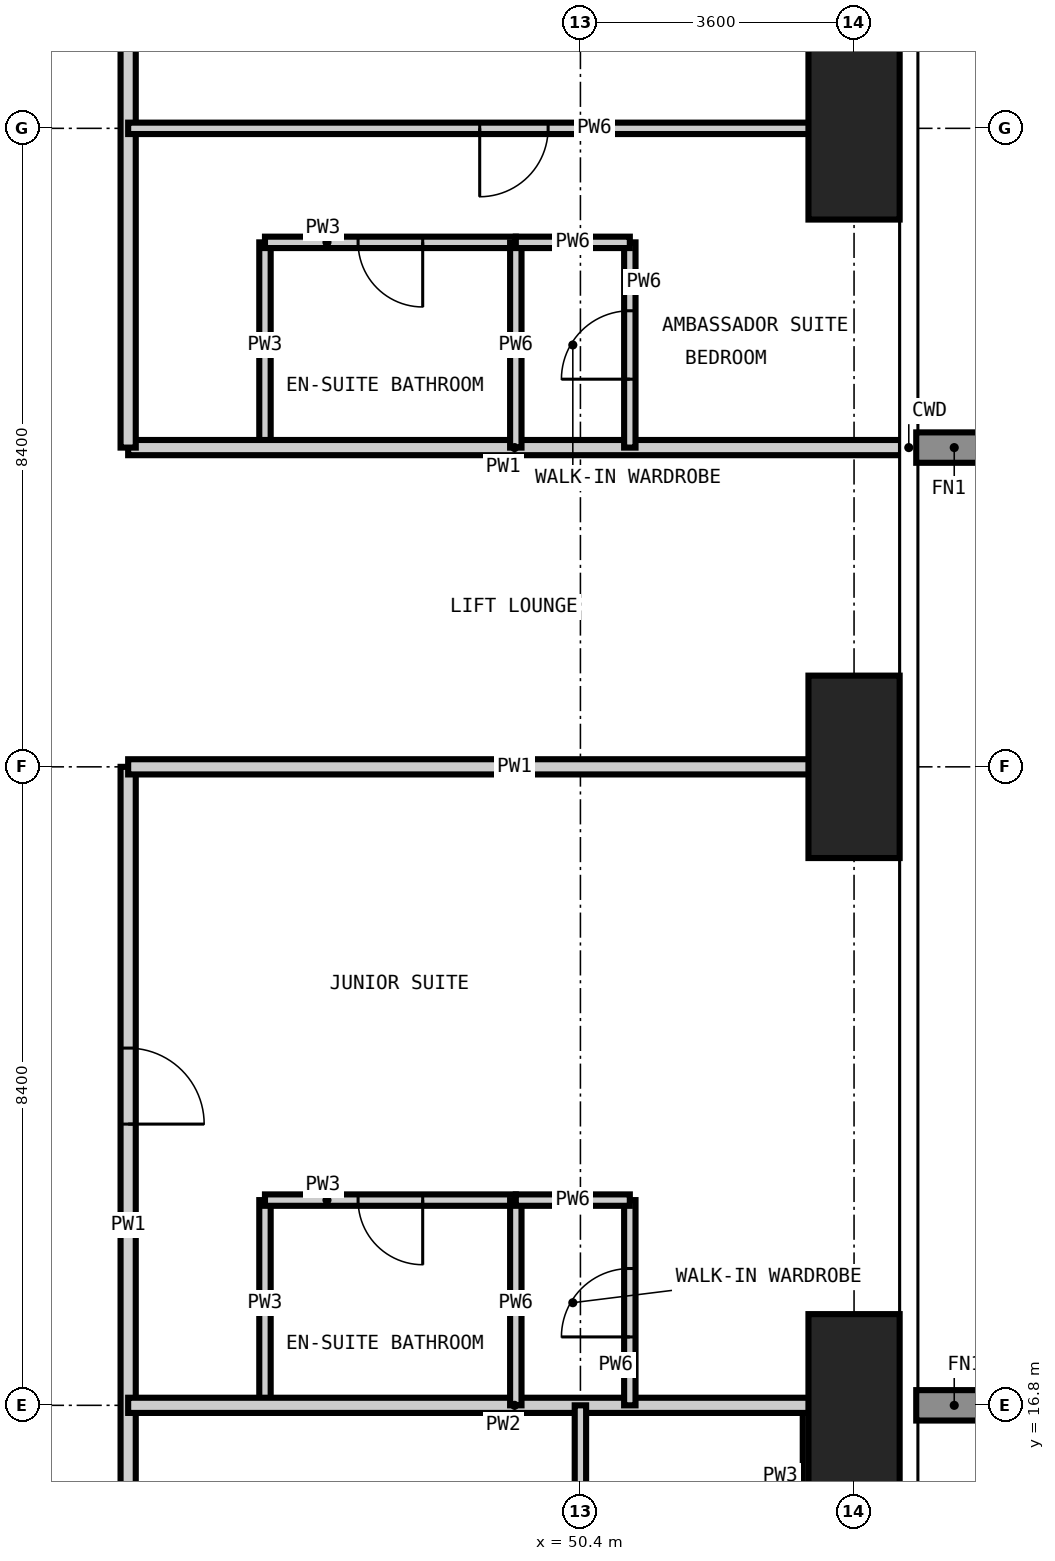
"""IFC4 building model, lengths in metres.
Left out: names, types, materials, properties, quantities, classifications, styles, units other than length and angle.
Written with IfcOpenShell. Run it as: python <this file> out.ifc"""

import sys

from ifc_helpers import new_model, si_unit, direction, frame, frame_2d, origin, origin_2d, place, context, subcontext, project, spatial, rectangle, extrude, element, fill, save


model = new_model("IFC4")
c1 = context("Model", 3, precision=1e-05, world=origin(), true_north=direction((0.0, 1.0)))
c2 = subcontext(c1, "Body", "Model", "MODEL_VIEW")
j1 = project(units=[si_unit("LENGTHUNIT", "METRE"), si_unit("PLANEANGLEUNIT", "RADIAN")], contexts=[c1])
p1 = place(None, origin())
s1 = spatial("IfcSite", under=j1, at=p1, CompositionType="ELEMENT")
p2 = place(p1, origin())
s2 = spatial("IfcBuilding", under=s1, at=p2, CompositionType="ELEMENT")
p3 = place(p2, frame((0.0, 0.0, 229.5)))
s3 = spatial("IfcBuildingStorey", under=s2, at=p3, CompositionType="ELEMENT", Elevation=229.5)
for number, where, z_axis, x_axis in (
    (1, (54.0, 16.8, -0.35), (0.0, 0.0, 1.0), (1.0, 0.0, 0.0)),
    (2, (54.0, 25.2, -0.35), (0.0, 0.0, 1.0), (1.0, 0.0, 0.0)),
    (3, (54.0, 33.6, -0.35), (0.0, 0.0, 1.0), (1.0, 0.0, 0.0)),
):
    element("IfcColumn", number, at=place(p3, frame(where, z_axis=z_axis, x_axis=x_axis)), inside=s3, PredefinedType="COLUMN", context=c2, shape_type="SweptSolid", body=[
        extrude(rectangle(XDim=1.2, YDim=2.4, at=origin_2d()), origin(), (0.0, 0.0, 1.0), 3.9),
    ])
p4 = place(p3, frame((46.25, 16.8, 0.0), z_axis=(0.0, 0.0, 1.0), x_axis=(0.0, 1.0, 0.0)))
e4 = element("IfcWall", 4, at=p4, inside=s3, PredefinedType="PARTITIONING", context=c2, shape_type="SweptSolid", body=[
    extrude(rectangle(XDim=2.7, YDim=0.15, at=frame_2d((1.35, 0.0))), origin(), (0.0, 0.0, 1.0), 3.55),
])
p5 = place(p3, frame((46.25, 29.4, 0.0), z_axis=(0.0, 0.0, 1.0), x_axis=(0.0, 1.0, 0.0)))
e5 = element("IfcWall", 5, at=p5, inside=s3, PredefinedType="PARTITIONING", context=c2, shape_type="SweptSolid", body=[
    extrude(rectangle(XDim=2.7, YDim=0.15, at=frame_2d((1.35, 0.0))), origin(), (0.0, 0.0, 1.0), 3.55),
])
p6 = place(p3, frame((53.4, 13.2, 0.0), z_axis=(0.0, 0.0, 1.0), x_axis=(0.0, 1.0, 0.0)))
e6 = element("IfcWall", 6, at=p6, inside=s3, PredefinedType="PARTITIONING", context=c2, shape_type="SweptSolid", body=[
    extrude(rectangle(XDim=3.6, YDim=0.15, at=frame_2d((1.8, 0.0))), origin(), (0.0, 0.0, 1.0), 3.55),
])
p7 = place(p6, frame((1.375, 0.0, 0.0)))
e7 = element("IfcOpeningElement", 7, at=p7, cuts=e6, PredefinedType="OPENING", context=c2, shape_type="SweptSolid", body=[
    extrude(rectangle(XDim=0.85, YDim=2.1, at=frame_2d((0.425, 1.05))), frame((0.0, 0.085, 0.0), z_axis=(0.0, -1.0, 0.0), x_axis=(1.0, 0.0, 0.0)), (0.0, 0.0, 1.0), 0.17),
])
p8 = place(p3, frame((46.25, 19.5, 0.0), z_axis=(0.0, 0.0, 1.0), x_axis=(1.0, 0.0, 0.0)))
e8 = element("IfcWall", 8, at=p8, inside=s3, PredefinedType="PARTITIONING", context=c2, shape_type="SweptSolid", body=[
    extrude(rectangle(XDim=3.3, YDim=0.15, at=frame_2d((1.65, 0.0))), origin(), (0.0, 0.0, 1.0), 3.55),
])
p9 = place(p8, frame((1.225, 0.0, 0.0)))
e9 = element("IfcOpeningElement", 9, at=p9, cuts=e8, PredefinedType="OPENING", context=c2, shape_type="SweptSolid", body=[
    extrude(rectangle(XDim=0.85, YDim=2.1, at=frame_2d((0.425, 1.05))), frame((0.0, 0.085, 0.0), z_axis=(0.0, -1.0, 0.0), x_axis=(1.0, 0.0, 0.0)), (0.0, 0.0, 1.0), 0.17),
])
p10 = place(p3, frame((46.25, 32.1, 0.0), z_axis=(0.0, 0.0, 1.0), x_axis=(1.0, 0.0, 0.0)))
e10 = element("IfcWall", 10, at=p10, inside=s3, PredefinedType="PARTITIONING", context=c2, shape_type="SweptSolid", body=[
    extrude(rectangle(XDim=3.3, YDim=0.15, at=frame_2d((1.65, 0.0))), origin(), (0.0, 0.0, 1.0), 3.55),
])
p11 = place(p10, frame((1.225, 0.0, 0.0)))
e11 = element("IfcOpeningElement", 11, at=p11, cuts=e10, PredefinedType="OPENING", context=c2, shape_type="SweptSolid", body=[
    extrude(rectangle(XDim=0.85, YDim=2.1, at=frame_2d((0.425, 1.05))), frame((0.0, 0.085, 0.0), z_axis=(0.0, -1.0, 0.0), x_axis=(1.0, 0.0, 0.0)), (0.0, 0.0, 1.0), 0.17),
])
p12 = place(p3, frame((44.45, 29.4, 0.0), z_axis=(0.0, 0.0, 1.0), x_axis=(1.0, 0.0, 0.0)))
e12 = element("IfcWall", 12, at=p12, inside=s3, PredefinedType="PARTITIONING", context=c2, shape_type="SweptSolid", body=[
    extrude(rectangle(XDim=10.168, YDim=0.2, at=frame_2d((5.084, 0.0))), origin(), (0.0, 0.0, 1.0), 3.55),
])
p13 = place(p3, frame((44.45, 25.2, 0.0), z_axis=(0.0, 0.0, 1.0), x_axis=(0.0, -1.0, 0.0)))
e13 = element("IfcWall", 13, at=p13, inside=s3, PredefinedType="PARTITIONING", context=c2, shape_type="SweptSolid", body=[
    extrude(rectangle(XDim=12.05, YDim=0.2, at=frame_2d((6.025, 0.0))), origin(), (0.0, 0.0, 1.0), 3.55),
])
p14 = place(p13, frame((3.7, 0.0, 0.0)))
e14 = element("IfcOpeningElement", 14, at=p14, cuts=e13, PredefinedType="OPENING", context=c2, shape_type="SweptSolid", body=[
    extrude(rectangle(XDim=1.0, YDim=2.2, at=frame_2d((0.5, 1.1))), frame((0.0, 0.11, 0.0), z_axis=(0.0, -1.0, 0.0), x_axis=(1.0, 0.0, 0.0)), (0.0, 0.0, 1.0), 0.22),
])
p15 = place(p13, frame((9.725, 0.0, 0.0)))
e15 = element("IfcOpeningElement", 15, at=p15, cuts=e13, PredefinedType="OPENING", context=c2, shape_type="SweptSolid", body=[
    extrude(rectangle(XDim=1.0, YDim=2.2, at=frame_2d((0.5, 1.1))), frame((0.0, 0.11, 0.0), z_axis=(0.0, -1.0, 0.0), x_axis=(1.0, 0.0, 0.0)), (0.0, 0.0, 1.0), 0.22),
])
p16 = place(p3, frame((44.45, 45.05, 0.0), z_axis=(0.0, 0.0, 1.0), x_axis=(0.0, -1.0, 0.0)))
e16 = element("IfcWall", 16, at=p16, inside=s3, PredefinedType="PARTITIONING", context=c2, shape_type="SweptSolid", body=[
    extrude(rectangle(XDim=15.65, YDim=0.2, at=frame_2d((7.825, 0.0))), origin(), (0.0, 0.0, 1.0), 3.55),
])
p17 = place(p16, frame((5.55, 0.0, 0.0)))
e17 = element("IfcOpeningElement", 17, at=p17, cuts=e16, PredefinedType="OPENING", context=c2, shape_type="SweptSolid", body=[
    extrude(rectangle(XDim=1.0, YDim=2.2, at=frame_2d((0.5, 1.1))), frame((0.0, 0.11, 0.0), z_axis=(0.0, -1.0, 0.0), x_axis=(1.0, 0.0, 0.0)), (0.0, 0.0, 1.0), 0.22),
])
p18 = place(p16, frame((1.025, 0.0, 0.0)))
e18 = element("IfcOpeningElement", 18, at=p18, cuts=e16, PredefinedType="OPENING", context=c2, shape_type="SweptSolid", body=[
    extrude(rectangle(XDim=1.0, YDim=2.2, at=frame_2d((0.5, 1.1))), frame((0.0, 0.11, 0.0), z_axis=(0.0, -1.0, 0.0), x_axis=(1.0, 0.0, 0.0)), (0.0, 0.0, 1.0), 0.22),
])
for number, where, z_axis, x_axis in (
    (19, (54.618, 25.2, 0.0), (0.0, 0.0, 1.0), (-1.0, 0.0, 0.0)),
    (20, (44.45, 16.8, 0.0), (0.0, 0.0, 1.0), (1.0, 0.0, 0.0)),
):
    element("IfcWall", number, at=place(p3, frame(where, z_axis=z_axis, x_axis=x_axis)), inside=s3, PredefinedType="PARTITIONING", context=c2, shape_type="SweptSolid", body=[
        extrude(rectangle(XDim=10.168, YDim=0.2, at=frame_2d((5.084, 0.0))), origin(), (0.0, 0.0, 1.0), 3.55),
    ])
p19 = place(p3, frame((49.55, 16.8, 0.0), z_axis=(0.0, 0.0, 1.0), x_axis=(0.0, 1.0, 0.0)))
e21 = element("IfcWall", 21, at=p19, inside=s3, PredefinedType="PARTITIONING", context=c2, shape_type="SweptSolid", body=[
    extrude(rectangle(XDim=2.7, YDim=0.15, at=frame_2d((1.35, 0.0))), origin(), (0.0, 0.0, 1.0), 3.55),
])
p20 = place(p3, frame((49.55, 29.4, 0.0), z_axis=(0.0, 0.0, 1.0), x_axis=(0.0, 1.0, 0.0)))
e22 = element("IfcWall", 22, at=p20, inside=s3, PredefinedType="PARTITIONING", context=c2, shape_type="SweptSolid", body=[
    extrude(rectangle(XDim=2.7, YDim=0.15, at=frame_2d((1.35, 0.0))), origin(), (0.0, 0.0, 1.0), 3.55),
])
p21 = place(p3, frame((50.4, 4.182, 0.0), z_axis=(0.0, 0.0, 1.0), x_axis=(0.0, 1.0, 0.0)))
e23 = element("IfcWall", 23, at=p21, inside=s3, PredefinedType="PARTITIONING", context=c2, shape_type="SweptSolid", body=[
    extrude(rectangle(XDim=12.618, YDim=0.15, at=frame_2d((6.309, 0.0))), origin(), (0.0, 0.0, 1.0), 3.55),
])
p22 = place(p21, frame((2.868, 0.0, 0.0)))
e24 = element("IfcOpeningElement", 24, at=p22, cuts=e23, PredefinedType="OPENING", context=c2, shape_type="SweptSolid", body=[
    extrude(rectangle(XDim=0.9, YDim=2.1, at=frame_2d((0.45, 1.05))), frame((0.0, 0.085, 0.0), z_axis=(0.0, -1.0, 0.0), x_axis=(1.0, 0.0, 0.0)), (0.0, 0.0, 1.0), 0.17),
])
p23 = place(p3, frame((51.05, 16.8, 0.0), z_axis=(0.0, 0.0, 1.0), x_axis=(0.0, 1.0, 0.0)))
e25 = element("IfcWall", 25, at=p23, inside=s3, PredefinedType="PARTITIONING", context=c2, shape_type="SweptSolid", body=[
    extrude(rectangle(XDim=2.7, YDim=0.15, at=frame_2d((1.35, 0.0))), origin(), (0.0, 0.0, 1.0), 3.55),
])
p24 = place(p23, frame((0.9, 0.0, 0.0)))
e26 = element("IfcOpeningElement", 26, at=p24, cuts=e25, PredefinedType="OPENING", context=c2, shape_type="SweptSolid", body=[
    extrude(rectangle(XDim=0.9, YDim=2.1, at=frame_2d((0.45, 1.05))), frame((0.0, 0.085, 0.0), z_axis=(0.0, -1.0, 0.0), x_axis=(1.0, 0.0, 0.0)), (0.0, 0.0, 1.0), 0.17),
])
p25 = place(p3, frame((51.05, 29.4, 0.0), z_axis=(0.0, 0.0, 1.0), x_axis=(0.0, 1.0, 0.0)))
e27 = element("IfcWall", 27, at=p25, inside=s3, PredefinedType="PARTITIONING", context=c2, shape_type="SweptSolid", body=[
    extrude(rectangle(XDim=2.7, YDim=0.15, at=frame_2d((1.35, 0.0))), origin(), (0.0, 0.0, 1.0), 3.55),
])
p26 = place(p25, frame((0.9, 0.0, 0.0)))
e28 = element("IfcOpeningElement", 28, at=p26, cuts=e27, PredefinedType="OPENING", context=c2, shape_type="SweptSolid", body=[
    extrude(rectangle(XDim=0.9, YDim=2.1, at=frame_2d((0.45, 1.05))), frame((0.0, 0.085, 0.0), z_axis=(0.0, -1.0, 0.0), x_axis=(1.0, 0.0, 0.0)), (0.0, 0.0, 1.0), 0.17),
])
for number, where, z_axis, x_axis in (
    (29, (49.55, 19.5, 0.0), (0.0, 0.0, 1.0), (1.0, 0.0, 0.0)),
    (30, (49.55, 32.1, 0.0), (0.0, 0.0, 1.0), (1.0, 0.0, 0.0)),
):
    element("IfcWall", number, at=place(p3, frame(where, z_axis=z_axis, x_axis=x_axis)), inside=s3, PredefinedType="PARTITIONING", context=c2, shape_type="SweptSolid", body=[
        extrude(rectangle(XDim=1.5, YDim=0.15, at=frame_2d((0.75, 0.0))), origin(), (0.0, 0.0, 1.0), 3.55),
    ])
p27 = place(p3, frame((44.45, 33.6, 0.0), z_axis=(0.0, 0.0, 1.0), x_axis=(1.0, 0.0, 0.0)))
e31 = element("IfcWall", 31, at=p27, inside=s3, PredefinedType="PARTITIONING", context=c2, shape_type="SweptSolid", body=[
    extrude(rectangle(XDim=10.168, YDim=0.15, at=frame_2d((5.084, 0.0))), origin(), (0.0, 0.0, 1.0), 3.55),
])
p28 = place(p27, frame((4.625, 0.0, 0.0)))
e32 = element("IfcOpeningElement", 32, at=p28, cuts=e31, PredefinedType="OPENING", context=c2, shape_type="SweptSolid", body=[
    extrude(rectangle(XDim=0.9, YDim=2.1, at=frame_2d((0.45, 1.05))), frame((0.0, 0.085, 0.0), z_axis=(0.0, -1.0, 0.0), x_axis=(1.0, 0.0, 0.0)), (0.0, 0.0, 1.0), 0.17),
])
p29 = place(p14, origin())
e33 = element("IfcDoor", 33, at=p29, inside=s3, OperationType="SINGLE_SWING_RIGHT", PredefinedType="DOOR", context=c2, shape_type="SweptSolid", body=[
    extrude(rectangle(XDim=1.0, YDim=2.2, at=frame_2d((0.5, 1.1))), frame((0.0, 0.025, 0.0), z_axis=(0.0, -1.0, 0.0), x_axis=(1.0, 0.0, 0.0)), (0.0, 0.0, 1.0), 0.05),
])
fill(e14, e33)
p30 = place(p9, frame((0.85, 0.0, 0.0), z_axis=(0.0, 0.0, 1.0), x_axis=(-1.0, 0.0, 0.0)))
e34 = element("IfcDoor", 34, at=p30, inside=s3, OperationType="SINGLE_SWING_LEFT", PredefinedType="DOOR", context=c2, shape_type="SweptSolid", body=[
    extrude(rectangle(XDim=0.85, YDim=2.1, at=frame_2d((0.425, 1.05))), frame((0.0, 0.025, 0.0), z_axis=(0.0, -1.0, 0.0), x_axis=(1.0, 0.0, 0.0)), (0.0, 0.0, 1.0), 0.05),
])
fill(e9, e34)
p31 = place(p24, origin())
e35 = element("IfcDoor", 35, at=p31, inside=s3, OperationType="SINGLE_SWING_LEFT", PredefinedType="DOOR", context=c2, shape_type="SweptSolid", body=[
    extrude(rectangle(XDim=0.9, YDim=2.1, at=frame_2d((0.45, 1.05))), frame((0.0, 0.025, 0.0), z_axis=(0.0, -1.0, 0.0), x_axis=(1.0, 0.0, 0.0)), (0.0, 0.0, 1.0), 0.05),
])
fill(e26, e35)
p32 = place(p28, frame((0.9, 0.0, 0.0), z_axis=(0.0, 0.0, 1.0), x_axis=(-1.0, 0.0, 0.0)))
e36 = element("IfcDoor", 36, at=p32, inside=s3, OperationType="SINGLE_SWING_RIGHT", PredefinedType="DOOR", context=c2, shape_type="SweptSolid", body=[
    extrude(rectangle(XDim=0.9, YDim=2.1, at=frame_2d((0.45, 1.05))), frame((0.0, 0.025, 0.0), z_axis=(0.0, -1.0, 0.0), x_axis=(1.0, 0.0, 0.0)), (0.0, 0.0, 1.0), 0.05),
])
fill(e32, e36)
p33 = place(p11, frame((0.85, 0.0, 0.0), z_axis=(0.0, 0.0, 1.0), x_axis=(-1.0, 0.0, 0.0)))
e37 = element("IfcDoor", 37, at=p33, inside=s3, OperationType="SINGLE_SWING_LEFT", PredefinedType="DOOR", context=c2, shape_type="SweptSolid", body=[
    extrude(rectangle(XDim=0.85, YDim=2.1, at=frame_2d((0.425, 1.05))), frame((0.0, 0.025, 0.0), z_axis=(0.0, -1.0, 0.0), x_axis=(1.0, 0.0, 0.0)), (0.0, 0.0, 1.0), 0.05),
])
fill(e11, e37)
p34 = place(p26, origin())
e38 = element("IfcDoor", 38, at=p34, inside=s3, OperationType="SINGLE_SWING_LEFT", PredefinedType="DOOR", context=c2, shape_type="SweptSolid", body=[
    extrude(rectangle(XDim=0.9, YDim=2.1, at=frame_2d((0.45, 1.05))), frame((0.0, 0.025, 0.0), z_axis=(0.0, -1.0, 0.0), x_axis=(1.0, 0.0, 0.0)), (0.0, 0.0, 1.0), 0.05),
])
fill(e28, e38)
save(model, sys.argv[1])
